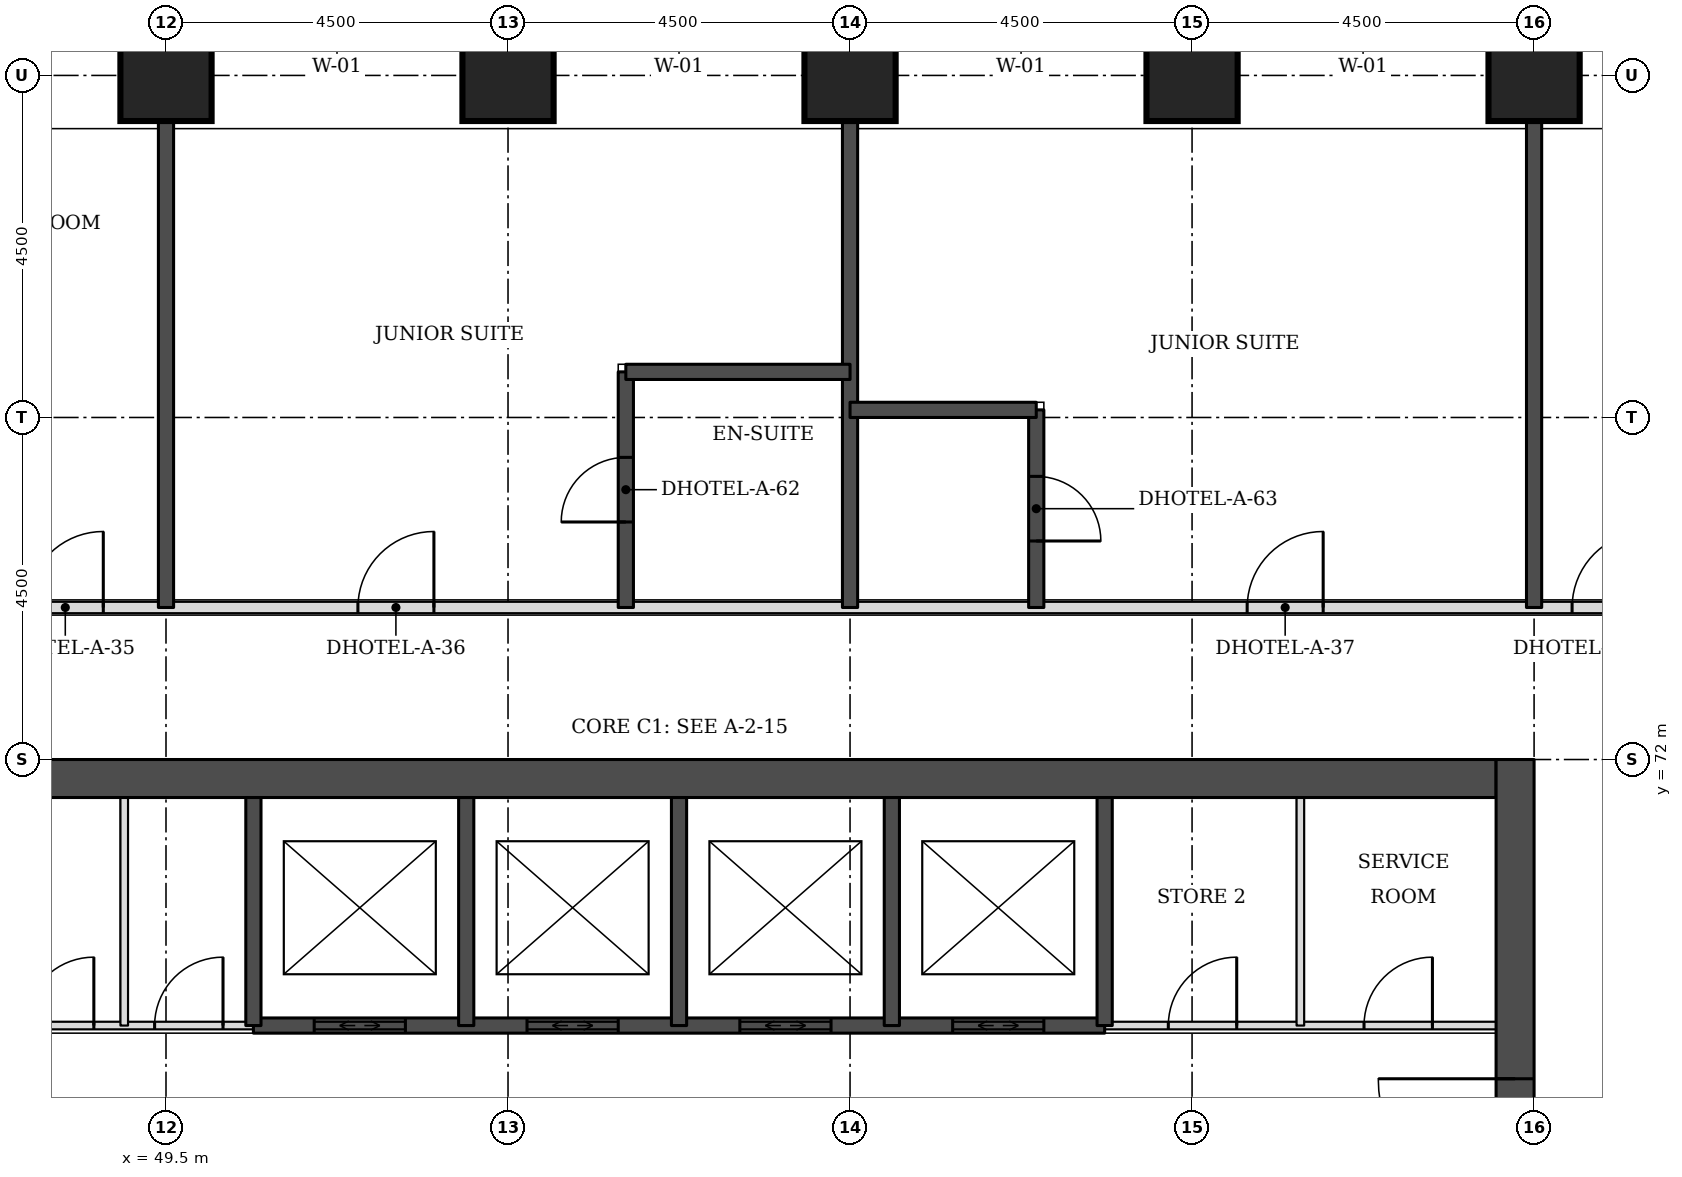
"""IFC4 building model, lengths in metres.
Left out: names, types, materials, properties, quantities, classifications, styles, units other than length and angle.
Written with IfcOpenShell. Run it as: python <this file> out.ifc"""

import sys

from ifc_helpers import new_model, si_unit, direction, frame, frame_2d, origin, origin_2d, place, context, subcontext, project, spatial, rectangle, extrude, element, fill, save


model = new_model("IFC4")
c1 = context("Model", 3, precision=1e-05, world=origin(), true_north=direction((0.0, 1.0)))
c2 = subcontext(c1, "Body", "Model", "MODEL_VIEW")
j1 = project(units=[si_unit("LENGTHUNIT", "METRE"), si_unit("PLANEANGLEUNIT", "RADIAN")], contexts=[c1])
p1 = place(None, origin())
s1 = spatial("IfcSite", under=j1, at=p1, CompositionType="ELEMENT")
p2 = place(p1, origin())
s2 = spatial("IfcBuilding", under=s1, at=p2, CompositionType="ELEMENT")
p3 = place(p2, frame((0.0, 0.0, 49.5)))
s3 = spatial("IfcBuildingStorey", under=s2, at=p3, CompositionType="ELEMENT", Elevation=49.5)
for number, where, z_axis, x_axis in (
    (1, (49.5, 81.0, 0.0), (0.0, 0.0, 1.0), (1.0, 0.0, 0.0)),
    (2, (54.0, 81.0, 0.0), (0.0, 0.0, 1.0), (1.0, 0.0, 0.0)),
    (3, (58.5, 81.0, 0.0), (0.0, 0.0, 1.0), (1.0, 0.0, 0.0)),
    (4, (63.0, 81.0, 0.0), (0.0, 0.0, 1.0), (1.0, 0.0, 0.0)),
    (5, (67.5, 81.0, 0.0), (0.0, 0.0, 1.0), (1.0, 0.0, 0.0)),
):
    element("IfcColumn", number, at=place(p3, frame(where, z_axis=z_axis, x_axis=x_axis)), inside=s3, PredefinedType="COLUMN", context=c2, shape_type="SweptSolid", body=[
        extrude(rectangle(XDim=1.2, YDim=1.2, at=origin_2d()), origin(), (0.0, 0.0, 1.0), 3.3),
    ])
p4 = place(p3, frame((45.5, 71.75, 0.0), z_axis=(0.0, 0.0, 1.0), x_axis=(1.0, 0.0, 0.0)))
e6 = element("IfcWall", 6, at=p4, inside=s3, PredefinedType="SHEAR", context=c2, shape_type="SweptSolid", body=[
    extrude(rectangle(XDim=21.5, YDim=0.5, at=frame_2d((10.75, 0.0))), origin(), (0.0, 0.0, 1.0), 3.3),
])
p5 = place(p3, frame((67.25, 49.5, 0.0), z_axis=(0.0, 0.0, 1.0), x_axis=(0.0, 1.0, 0.0)))
e7 = element("IfcWall", 7, at=p5, inside=s3, PredefinedType="SHEAR", context=c2, shape_type="SweptSolid", body=[
    extrude(rectangle(XDim=22.5, YDim=0.5, at=frame_2d((11.25, 0.0))), origin(), (0.0, 0.0, 1.0), 3.3),
])
p6 = place(p5, frame((4.2, 0.0, 0.0)))
e8 = element("IfcOpeningElement", 8, at=p6, cuts=e7, PredefinedType="OPENING", context=c2, shape_type="SweptSolid", body=[
    extrude(rectangle(XDim=1.8, YDim=2.1, at=frame_2d((0.9, 1.05))), frame((0.0, 0.26, 0.0), z_axis=(0.0, -1.0, 0.0), x_axis=(1.0, 0.0, 0.0)), (0.0, 0.0, 1.0), 0.52),
])
p7 = place(p5, frame((6.9, 0.0, 0.0)))
e9 = element("IfcOpeningElement", 9, at=p7, cuts=e7, PredefinedType="OPENING", context=c2, shape_type="SweptSolid", body=[
    extrude(rectangle(XDim=1.1, YDim=2.1, at=frame_2d((0.55, 1.05))), frame((0.0, 0.26, 0.0), z_axis=(0.0, -1.0, 0.0), x_axis=(1.0, 0.0, 0.0)), (0.0, 0.0, 1.0), 0.52),
])
p8 = place(p5, frame((13.6, 0.0, 0.0)))
e10 = element("IfcOpeningElement", 10, at=p8, cuts=e7, PredefinedType="OPENING", context=c2, shape_type="SweptSolid", body=[
    extrude(rectangle(XDim=1.1, YDim=2.1, at=frame_2d((0.55, 1.05))), frame((0.0, 0.26, 0.0), z_axis=(0.0, -1.0, 0.0), x_axis=(1.0, 0.0, 0.0)), (0.0, 0.0, 1.0), 0.52),
])
p9 = place(p5, frame((16.5, 0.0, 0.0)))
e11 = element("IfcOpeningElement", 11, at=p9, cuts=e7, PredefinedType="OPENING", context=c2, shape_type="SweptSolid", body=[
    extrude(rectangle(XDim=1.8, YDim=2.1, at=frame_2d((0.9, 1.05))), frame((0.0, 0.26, 0.0), z_axis=(0.0, -1.0, 0.0), x_axis=(1.0, 0.0, 0.0)), (0.0, 0.0, 1.0), 0.52),
])
p10 = place(p3, frame((43.0, 74.0, 0.0), z_axis=(0.0, 0.0, 1.0), x_axis=(1.0, 0.0, 0.0)))
e12 = element("IfcWall", 12, at=p10, inside=s3, PredefinedType="PARTITIONING", context=c2, shape_type="SweptSolid", body=[
    extrude(rectangle(XDim=26.5, YDim=0.15, at=frame_2d((13.25, 0.0))), origin(), (0.0, 0.0, 1.0), 3.08),
])
p11 = place(p10, frame((4.675, 0.0, 0.0)))
e13 = element("IfcOpeningElement", 13, at=p11, cuts=e12, PredefinedType="OPENING", context=c2, shape_type="SweptSolid", body=[
    extrude(rectangle(XDim=1.0, YDim=2.1, at=frame_2d((0.5, 1.05))), frame((0.0, 0.085, 0.0), z_axis=(0.0, -1.0, 0.0), x_axis=(1.0, 0.0, 0.0)), (0.0, 0.0, 1.0), 0.17),
])
p12 = place(p10, frame((9.025, 0.0, 0.0)))
e14 = element("IfcOpeningElement", 14, at=p12, cuts=e12, PredefinedType="OPENING", context=c2, shape_type="SweptSolid", body=[
    extrude(rectangle(XDim=1.0, YDim=2.1, at=frame_2d((0.5, 1.05))), frame((0.0, 0.085, 0.0), z_axis=(0.0, -1.0, 0.0), x_axis=(1.0, 0.0, 0.0)), (0.0, 0.0, 1.0), 0.17),
])
p13 = place(p10, frame((20.725, 0.0, 0.0)))
e15 = element("IfcOpeningElement", 15, at=p13, cuts=e12, PredefinedType="OPENING", context=c2, shape_type="SweptSolid", body=[
    extrude(rectangle(XDim=1.0, YDim=2.1, at=frame_2d((0.5, 1.05))), frame((0.0, 0.085, 0.0), z_axis=(0.0, -1.0, 0.0), x_axis=(1.0, 0.0, 0.0)), (0.0, 0.0, 1.0), 0.17),
])
p14 = place(p10, frame((0.5, 0.0, 0.0)))
e16 = element("IfcOpeningElement", 16, at=p14, cuts=e12, PredefinedType="OPENING", context=c2, shape_type="SweptSolid", body=[
    extrude(rectangle(XDim=1.0, YDim=2.1, at=frame_2d((0.5, 1.05))), frame((0.0, 0.085, 0.0), z_axis=(0.0, -1.0, 0.0), x_axis=(1.0, 0.0, 0.0)), (0.0, 0.0, 1.0), 0.17),
])
p15 = place(p10, frame((25.0, 0.0, 0.0)))
e17 = element("IfcOpeningElement", 17, at=p15, cuts=e12, PredefinedType="OPENING", context=c2, shape_type="SweptSolid", body=[
    extrude(rectangle(XDim=1.0, YDim=2.1, at=frame_2d((0.5, 1.05))), frame((0.0, 0.085, 0.0), z_axis=(0.0, -1.0, 0.0), x_axis=(1.0, 0.0, 0.0)), (0.0, 0.0, 1.0), 0.17),
])
p16 = place(p3, frame((49.5, 74.0, 0.0), z_axis=(0.0, 0.0, 1.0), x_axis=(0.0, 1.0, 0.0)))
e18 = element("IfcWall", 18, at=p16, inside=s3, PredefinedType="SOLIDWALL", context=c2, shape_type="SweptSolid", body=[
    extrude(rectangle(XDim=6.4, YDim=0.2, at=frame_2d((3.2, 0.0))), origin(), (0.0, 0.0, 1.0), 3.08),
])
p17 = place(p3, frame((55.55, 74.0, 0.0), z_axis=(0.0, 0.0, 1.0), x_axis=(0.0, 1.0, 0.0)))
e19 = element("IfcWall", 19, at=p17, inside=s3, PredefinedType="SOLIDWALL", context=c2, shape_type="SweptSolid", body=[
    extrude(rectangle(XDim=3.1, YDim=0.2, at=frame_2d((1.55, 0.0))), origin(), (0.0, 0.0, 1.0), 3.08),
])
p18 = place(p17, frame((1.125, 0.0, 0.0)))
e20 = element("IfcOpeningElement", 20, at=p18, cuts=e19, PredefinedType="OPENING", context=c2, shape_type="SweptSolid", body=[
    extrude(rectangle(XDim=0.85, YDim=2.1, at=frame_2d((0.425, 1.05))), frame((0.0, 0.11, 0.0), z_axis=(0.0, -1.0, 0.0), x_axis=(1.0, 0.0, 0.0)), (0.0, 0.0, 1.0), 0.22),
])
p19 = place(p3, frame((58.5, 74.0, 0.0), z_axis=(0.0, 0.0, 1.0), x_axis=(0.0, 1.0, 0.0)))
e21 = element("IfcWall", 21, at=p19, inside=s3, PredefinedType="SOLIDWALL", context=c2, shape_type="SweptSolid", body=[
    extrude(rectangle(XDim=6.4, YDim=0.2, at=frame_2d((3.2, 0.0))), origin(), (0.0, 0.0, 1.0), 3.08),
])
p20 = place(p3, frame((60.95, 74.0, 0.0), z_axis=(0.0, 0.0, 1.0), x_axis=(0.0, 1.0, 0.0)))
e22 = element("IfcWall", 22, at=p20, inside=s3, PredefinedType="SOLIDWALL", context=c2, shape_type="SweptSolid", body=[
    extrude(rectangle(XDim=2.6, YDim=0.2, at=frame_2d((1.3, 0.0))), origin(), (0.0, 0.0, 1.0), 3.08),
])
p21 = place(p20, frame((0.875, 0.0, 0.0)))
e23 = element("IfcOpeningElement", 23, at=p21, cuts=e22, PredefinedType="OPENING", context=c2, shape_type="SweptSolid", body=[
    extrude(rectangle(XDim=0.85, YDim=2.1, at=frame_2d((0.425, 1.05))), frame((0.0, 0.11, 0.0), z_axis=(0.0, -1.0, 0.0), x_axis=(1.0, 0.0, 0.0)), (0.0, 0.0, 1.0), 0.22),
])
p22 = place(p3, frame((67.5, 74.0, 0.0), z_axis=(0.0, 0.0, 1.0), x_axis=(0.0, 1.0, 0.0)))
e24 = element("IfcWall", 24, at=p22, inside=s3, PredefinedType="SOLIDWALL", context=c2, shape_type="SweptSolid", body=[
    extrude(rectangle(XDim=6.4, YDim=0.2, at=frame_2d((3.2, 0.0))), origin(), (0.0, 0.0, 1.0), 3.08),
])
p23 = place(p3, frame((58.5, 76.6, 0.0), z_axis=(0.0, 0.0, 1.0), x_axis=(1.0, 0.0, 0.0)))
e25 = element("IfcWall", 25, at=p23, inside=s3, PredefinedType="SOLIDWALL", context=c2, shape_type="SweptSolid", body=[
    extrude(rectangle(XDim=2.45, YDim=0.2, at=frame_2d((1.225, 0.0))), origin(), (0.0, 0.0, 1.0), 3.08),
])
p24 = place(p3, frame((55.55, 77.1, 0.0), z_axis=(0.0, 0.0, 1.0), x_axis=(1.0, 0.0, 0.0)))
e26 = element("IfcWall", 26, at=p24, inside=s3, PredefinedType="SOLIDWALL", context=c2, shape_type="SweptSolid", body=[
    extrude(rectangle(XDim=2.95, YDim=0.2, at=frame_2d((1.475, 0.0))), origin(), (0.0, 0.0, 1.0), 3.08),
])
p25 = place(p3, frame((45.5, 68.5, 0.0), z_axis=(0.0, 0.0, 1.0), x_axis=(1.0, 0.0, 0.0)))
e27 = element("IfcWall", 27, at=p25, inside=s3, PredefinedType="PARTITIONING", context=c2, shape_type="SweptSolid", body=[
    extrude(rectangle(XDim=5.15, YDim=0.1, at=frame_2d((2.575, 0.0))), origin(), (0.0, 0.0, 1.0), 3.08),
])
p26 = place(p25, frame((0.426, 0.0, 0.0)))
e28 = element("IfcOpeningElement", 28, at=p26, cuts=e27, PredefinedType="OPENING", context=c2, shape_type="SweptSolid", body=[
    extrude(rectangle(XDim=0.9, YDim=2.1, at=frame_2d((0.45, 1.05))), frame((0.0, 0.06, 0.0), z_axis=(0.0, -1.0, 0.0), x_axis=(1.0, 0.0, 0.0)), (0.0, 0.0, 1.0), 0.12),
])
p27 = place(p25, frame((2.151, 0.0, 0.0)))
e29 = element("IfcOpeningElement", 29, at=p27, cuts=e27, PredefinedType="OPENING", context=c2, shape_type="SweptSolid", body=[
    extrude(rectangle(XDim=0.9, YDim=2.1, at=frame_2d((0.45, 1.05))), frame((0.0, 0.06, 0.0), z_axis=(0.0, -1.0, 0.0), x_axis=(1.0, 0.0, 0.0)), (0.0, 0.0, 1.0), 0.12),
])
p28 = place(p25, frame((3.85, 0.0, 0.0)))
e30 = element("IfcOpeningElement", 30, at=p28, cuts=e27, PredefinedType="OPENING", context=c2, shape_type="SweptSolid", body=[
    extrude(rectangle(XDim=0.9, YDim=2.1, at=frame_2d((0.45, 1.05))), frame((0.0, 0.06, 0.0), z_axis=(0.0, -1.0, 0.0), x_axis=(1.0, 0.0, 0.0)), (0.0, 0.0, 1.0), 0.12),
])
p29 = place(p3, frame((61.85, 68.5, 0.0), z_axis=(0.0, 0.0, 1.0), x_axis=(1.0, 0.0, 0.0)))
e31 = element("IfcWall", 31, at=p29, inside=s3, PredefinedType="PARTITIONING", context=c2, shape_type="SweptSolid", body=[
    extrude(rectangle(XDim=5.15, YDim=0.1, at=frame_2d((2.575, 0.0))), origin(), (0.0, 0.0, 1.0), 3.08),
])
p30 = place(p29, frame((3.413, 0.0, 0.0)))
e32 = element("IfcOpeningElement", 32, at=p30, cuts=e31, PredefinedType="OPENING", context=c2, shape_type="SweptSolid", body=[
    extrude(rectangle(XDim=0.9, YDim=2.1, at=frame_2d((0.45, 1.05))), frame((0.0, 0.06, 0.0), z_axis=(0.0, -1.0, 0.0), x_axis=(1.0, 0.0, 0.0)), (0.0, 0.0, 1.0), 0.12),
])
p31 = place(p29, frame((0.837, 0.0, 0.0)))
e33 = element("IfcOpeningElement", 33, at=p31, cuts=e31, PredefinedType="OPENING", context=c2, shape_type="SweptSolid", body=[
    extrude(rectangle(XDim=0.9, YDim=2.1, at=frame_2d((0.45, 1.05))), frame((0.0, 0.06, 0.0), z_axis=(0.0, -1.0, 0.0), x_axis=(1.0, 0.0, 0.0)), (0.0, 0.0, 1.0), 0.12),
])
p32 = place(p3, frame((50.65, 68.5, 0.0), z_axis=(0.0, 0.0, 1.0), x_axis=(1.0, 0.0, 0.0)))
e34 = element("IfcWall", 34, at=p32, inside=s3, PredefinedType="SOLIDWALL", context=c2, shape_type="SweptSolid", body=[
    extrude(rectangle(XDim=11.2, YDim=0.2, at=frame_2d((5.6, 0.0))), origin(), (0.0, 0.0, 1.0), 3.08),
])
p33 = place(p32, frame((0.8, 0.0, 0.0)))
e35 = element("IfcOpeningElement", 35, at=p33, cuts=e34, PredefinedType="OPENING", context=c2, shape_type="SweptSolid", body=[
    extrude(rectangle(XDim=1.2, YDim=2.1, at=frame_2d((0.6, 1.05))), frame((0.0, 0.11, 0.0), z_axis=(0.0, -1.0, 0.0), x_axis=(1.0, 0.0, 0.0)), (0.0, 0.0, 1.0), 0.22),
])
p34 = place(p32, frame((3.6, 0.0, 0.0)))
e36 = element("IfcOpeningElement", 36, at=p34, cuts=e34, PredefinedType="OPENING", context=c2, shape_type="SweptSolid", body=[
    extrude(rectangle(XDim=1.2, YDim=2.1, at=frame_2d((0.6, 1.05))), frame((0.0, 0.11, 0.0), z_axis=(0.0, -1.0, 0.0), x_axis=(1.0, 0.0, 0.0)), (0.0, 0.0, 1.0), 0.22),
])
p35 = place(p32, frame((6.4, 0.0, 0.0)))
e37 = element("IfcOpeningElement", 37, at=p35, cuts=e34, PredefinedType="OPENING", context=c2, shape_type="SweptSolid", body=[
    extrude(rectangle(XDim=1.2, YDim=2.1, at=frame_2d((0.6, 1.05))), frame((0.0, 0.11, 0.0), z_axis=(0.0, -1.0, 0.0), x_axis=(1.0, 0.0, 0.0)), (0.0, 0.0, 1.0), 0.22),
])
p36 = place(p32, frame((9.2, 0.0, 0.0)))
e38 = element("IfcOpeningElement", 38, at=p36, cuts=e34, PredefinedType="OPENING", context=c2, shape_type="SweptSolid", body=[
    extrude(rectangle(XDim=1.2, YDim=2.1, at=frame_2d((0.6, 1.05))), frame((0.0, 0.11, 0.0), z_axis=(0.0, -1.0, 0.0), x_axis=(1.0, 0.0, 0.0)), (0.0, 0.0, 1.0), 0.22),
])
p37 = place(p3, frame((48.95, 68.5, 0.0), z_axis=(0.0, 0.0, 1.0), x_axis=(0.0, 1.0, 0.0)))
e39 = element("IfcWall", 39, at=p37, inside=s3, PredefinedType="PARTITIONING", context=c2, shape_type="SweptSolid", body=[
    extrude(rectangle(XDim=3.0, YDim=0.1, at=frame_2d((1.5, 0.0))), origin(), (0.0, 0.0, 1.0), 3.08),
])
for number, where, z_axis, x_axis in (
    (40, (50.65, 68.5, 0.0), (0.0, 0.0, 1.0), (0.0, 1.0, 0.0)),
    (41, (53.45, 68.5, 0.0), (0.0, 0.0, 1.0), (0.0, 1.0, 0.0)),
    (42, (56.25, 68.5, 0.0), (0.0, 0.0, 1.0), (0.0, 1.0, 0.0)),
    (43, (59.05, 68.5, 0.0), (0.0, 0.0, 1.0), (0.0, 1.0, 0.0)),
    (44, (61.85, 68.5, 0.0), (0.0, 0.0, 1.0), (0.0, 1.0, 0.0)),
):
    element("IfcWall", number, at=place(p3, frame(where, z_axis=z_axis, x_axis=x_axis)), inside=s3, PredefinedType="SOLIDWALL", context=c2, shape_type="SweptSolid", body=[
        extrude(rectangle(XDim=3.0, YDim=0.2, at=frame_2d((1.5, 0.0))), origin(), (0.0, 0.0, 1.0), 3.08),
    ])
p38 = place(p3, frame((64.425, 68.5, 0.0), z_axis=(0.0, 0.0, 1.0), x_axis=(0.0, 1.0, 0.0)))
e45 = element("IfcWall", 45, at=p38, inside=s3, PredefinedType="PARTITIONING", context=c2, shape_type="SweptSolid", body=[
    extrude(rectangle(XDim=3.0, YDim=0.1, at=frame_2d((1.5, 0.0))), origin(), (0.0, 0.0, 1.0), 3.08),
])
p39 = place(p11, origin())
e46 = element("IfcDoor", 46, at=p39, inside=s3, OperationType="SINGLE_SWING_RIGHT", PredefinedType="DOOR", context=c2, shape_type="SweptSolid", body=[
    extrude(rectangle(XDim=1.0, YDim=2.1, at=frame_2d((0.5, 1.05))), frame((0.0, 0.025, 0.0), z_axis=(0.0, -1.0, 0.0), x_axis=(1.0, 0.0, 0.0)), (0.0, 0.0, 1.0), 0.05),
])
fill(e13, e46)
p40 = place(p12, origin())
e47 = element("IfcDoor", 47, at=p40, inside=s3, OperationType="SINGLE_SWING_RIGHT", PredefinedType="DOOR", context=c2, shape_type="SweptSolid", body=[
    extrude(rectangle(XDim=1.0, YDim=2.1, at=frame_2d((0.5, 1.05))), frame((0.0, 0.025, 0.0), z_axis=(0.0, -1.0, 0.0), x_axis=(1.0, 0.0, 0.0)), (0.0, 0.0, 1.0), 0.05),
])
fill(e14, e47)
p41 = place(p18, origin())
e48 = element("IfcDoor", 48, at=p41, inside=s3, OperationType="SINGLE_SWING_LEFT", PredefinedType="DOOR", context=c2, shape_type="SweptSolid", body=[
    extrude(rectangle(XDim=0.85, YDim=2.1, at=frame_2d((0.425, 1.05))), frame((0.0, 0.025, 0.0), z_axis=(0.0, -1.0, 0.0), x_axis=(1.0, 0.0, 0.0)), (0.0, 0.0, 1.0), 0.05),
])
fill(e20, e48)
p42 = place(p13, origin())
e49 = element("IfcDoor", 49, at=p42, inside=s3, OperationType="SINGLE_SWING_RIGHT", PredefinedType="DOOR", context=c2, shape_type="SweptSolid", body=[
    extrude(rectangle(XDim=1.0, YDim=2.1, at=frame_2d((0.5, 1.05))), frame((0.0, 0.025, 0.0), z_axis=(0.0, -1.0, 0.0), x_axis=(1.0, 0.0, 0.0)), (0.0, 0.0, 1.0), 0.05),
])
fill(e15, e49)
p43 = place(p21, frame((0.85, 0.0, 0.0), z_axis=(0.0, 0.0, 1.0), x_axis=(-1.0, 0.0, 0.0)))
e50 = element("IfcDoor", 50, at=p43, inside=s3, OperationType="SINGLE_SWING_RIGHT", PredefinedType="DOOR", context=c2, shape_type="SweptSolid", body=[
    extrude(rectangle(XDim=0.85, YDim=2.1, at=frame_2d((0.425, 1.05))), frame((0.0, 0.025, 0.0), z_axis=(0.0, -1.0, 0.0), x_axis=(1.0, 0.0, 0.0)), (0.0, 0.0, 1.0), 0.05),
])
fill(e23, e50)
p44 = place(p15, origin())
e51 = element("IfcDoor", 51, at=p44, inside=s3, OperationType="SINGLE_SWING_RIGHT", PredefinedType="DOOR", context=c2, shape_type="SweptSolid", body=[
    extrude(rectangle(XDim=1.0, YDim=2.1, at=frame_2d((0.5, 1.05))), frame((0.0, 0.025, 0.0), z_axis=(0.0, -1.0, 0.0), x_axis=(1.0, 0.0, 0.0)), (0.0, 0.0, 1.0), 0.05),
])
fill(e17, e51)
p45 = place(p33, origin())
e52 = element("IfcDoor", 52, at=p45, inside=s3, OperationType="DOUBLE_DOOR_SLIDING", PredefinedType="DOOR", context=c2, shape_type="SweptSolid", body=[
    extrude(rectangle(XDim=1.2, YDim=2.1, at=frame_2d((0.6, 1.05))), frame((0.0, 0.025, 0.0), z_axis=(0.0, -1.0, 0.0), x_axis=(1.0, 0.0, 0.0)), (0.0, 0.0, 1.0), 0.05),
])
fill(e35, e52)
p46 = place(p34, origin())
e53 = element("IfcDoor", 53, at=p46, inside=s3, OperationType="DOUBLE_DOOR_SLIDING", PredefinedType="DOOR", context=c2, shape_type="SweptSolid", body=[
    extrude(rectangle(XDim=1.2, YDim=2.1, at=frame_2d((0.6, 1.05))), frame((0.0, 0.025, 0.0), z_axis=(0.0, -1.0, 0.0), x_axis=(1.0, 0.0, 0.0)), (0.0, 0.0, 1.0), 0.05),
])
fill(e36, e53)
p47 = place(p35, origin())
e54 = element("IfcDoor", 54, at=p47, inside=s3, OperationType="DOUBLE_DOOR_SLIDING", PredefinedType="DOOR", context=c2, shape_type="SweptSolid", body=[
    extrude(rectangle(XDim=1.2, YDim=2.1, at=frame_2d((0.6, 1.05))), frame((0.0, 0.025, 0.0), z_axis=(0.0, -1.0, 0.0), x_axis=(1.0, 0.0, 0.0)), (0.0, 0.0, 1.0), 0.05),
])
fill(e37, e54)
p48 = place(p36, origin())
e55 = element("IfcDoor", 55, at=p48, inside=s3, OperationType="DOUBLE_DOOR_SLIDING", PredefinedType="DOOR", context=c2, shape_type="SweptSolid", body=[
    extrude(rectangle(XDim=1.2, YDim=2.1, at=frame_2d((0.6, 1.05))), frame((0.0, 0.025, 0.0), z_axis=(0.0, -1.0, 0.0), x_axis=(1.0, 0.0, 0.0)), (0.0, 0.0, 1.0), 0.05),
])
fill(e38, e55)
p49 = place(p9, origin())
e56 = element("IfcDoor", 56, at=p49, inside=s3, OperationType="SINGLE_SWING_RIGHT", PredefinedType="DOOR", context=c2, shape_type="SweptSolid", body=[
    extrude(rectangle(XDim=1.8, YDim=2.1, at=frame_2d((0.9, 1.05))), frame((0.0, 0.025, 0.0), z_axis=(0.0, -1.0, 0.0), x_axis=(1.0, 0.0, 0.0)), (0.0, 0.0, 1.0), 0.05),
])
fill(e11, e56)
p50 = place(p30, origin())
e57 = element("IfcDoor", 57, at=p50, inside=s3, OperationType="SINGLE_SWING_RIGHT", PredefinedType="DOOR", context=c2, shape_type="SweptSolid", body=[
    extrude(rectangle(XDim=0.9, YDim=2.1, at=frame_2d((0.45, 1.05))), frame((0.0, 0.025, 0.0), z_axis=(0.0, -1.0, 0.0), x_axis=(1.0, 0.0, 0.0)), (0.0, 0.0, 1.0), 0.05),
])
fill(e32, e57)
p51 = place(p31, origin())
e58 = element("IfcDoor", 58, at=p51, inside=s3, OperationType="SINGLE_SWING_RIGHT", PredefinedType="DOOR", context=c2, shape_type="SweptSolid", body=[
    extrude(rectangle(XDim=0.9, YDim=2.1, at=frame_2d((0.45, 1.05))), frame((0.0, 0.025, 0.0), z_axis=(0.0, -1.0, 0.0), x_axis=(1.0, 0.0, 0.0)), (0.0, 0.0, 1.0), 0.05),
])
fill(e33, e58)
p52 = place(p27, origin())
e59 = element("IfcDoor", 59, at=p52, inside=s3, OperationType="SINGLE_SWING_RIGHT", PredefinedType="DOOR", context=c2, shape_type="SweptSolid", body=[
    extrude(rectangle(XDim=0.9, YDim=2.1, at=frame_2d((0.45, 1.05))), frame((0.0, 0.025, 0.0), z_axis=(0.0, -1.0, 0.0), x_axis=(1.0, 0.0, 0.0)), (0.0, 0.0, 1.0), 0.05),
])
fill(e29, e59)
p53 = place(p28, origin())
e60 = element("IfcDoor", 60, at=p53, inside=s3, OperationType="SINGLE_SWING_RIGHT", PredefinedType="DOOR", context=c2, shape_type="SweptSolid", body=[
    extrude(rectangle(XDim=0.9, YDim=2.1, at=frame_2d((0.45, 1.05))), frame((0.0, 0.025, 0.0), z_axis=(0.0, -1.0, 0.0), x_axis=(1.0, 0.0, 0.0)), (0.0, 0.0, 1.0), 0.05),
])
fill(e30, e60)
save(model, sys.argv[1])
